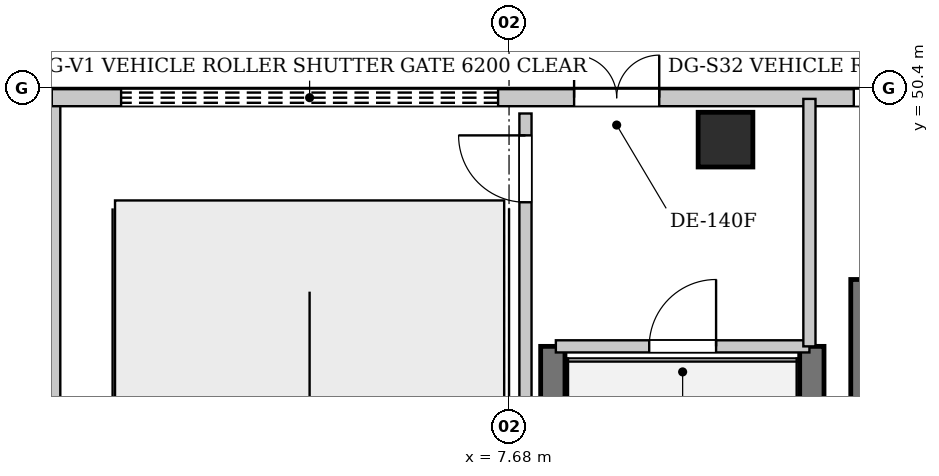
"""IFC4 building model, lengths in metres.
Left out: names, types, materials, properties, quantities, classifications, styles, units other than length and angle.
Written with IfcOpenShell. Run it as: python <this file> out.ifc"""

import sys

from ifc_helpers import new_model, si_unit, direction, frame, frame_2d, origin, origin_2d, place, context, subcontext, project, spatial, rectangle, extrude, element, fill, save


model = new_model("IFC4")
c1 = context("Model", 3, precision=1e-05, world=origin(), true_north=direction((0.0, 1.0)))
c2 = subcontext(c1, "Body", "Model", "MODEL_VIEW")
j1 = project(units=[si_unit("LENGTHUNIT", "METRE"), si_unit("PLANEANGLEUNIT", "RADIAN")], contexts=[c1])
p1 = place(None, origin())
s1 = spatial("IfcSite", under=j1, at=p1, CompositionType="ELEMENT")
p2 = place(p1, origin())
s2 = spatial("IfcBuilding", under=s1, at=p2, CompositionType="ELEMENT")
p3 = place(p2, origin())
s3 = spatial("IfcBuildingStorey", under=s2, at=p3, CompositionType="ELEMENT", Elevation=0.0)
for number, where, z_axis, x_axis in (
    (1, (8.4, 37.9, 0.0), (0.0, 0.0, 1.0), (0.0, 1.0, 0.0)),
    (2, (12.66, 37.9, 0.0), (0.0, 0.0, 1.0), (0.0, 1.0, 0.0)),
):
    element("IfcWall", number, at=place(p3, frame(where, z_axis=z_axis, x_axis=x_axis)), inside=s3, PredefinedType="SHEAR", context=c2, shape_type="SweptSolid", body=[
        extrude(rectangle(XDim=8.25, YDim=0.4, at=frame_2d((4.125, 0.0))), origin(), (0.0, 0.0, 1.0), 4.94),
    ])
p4 = place(p3, frame((13.5, 39.65, 0.0), z_axis=(0.0, 0.0, 1.0), x_axis=(0.0, 1.0, 0.0)))
e3 = element("IfcWall", 3, at=p4, inside=s3, PredefinedType="SHEAR", context=c2, shape_type="SweptSolid", body=[
    extrude(rectangle(XDim=7.6, YDim=0.4, at=frame_2d((3.8, 0.0))), origin(), (0.0, 0.0, 1.0), 4.94),
])
p5 = place(p3, frame((11.24, 49.55, 0.0), z_axis=(0.0, 0.0, 1.0), x_axis=(1.0, 0.0, 0.0)))
e4 = element("IfcColumn", 4, at=p5, inside=s3, PredefinedType="COLUMN", context=c2, shape_type="SweptSolid", body=[
    extrude(rectangle(XDim=0.9, YDim=0.9, at=origin_2d()), origin(), (0.0, 0.0, 1.0), 5.2),
])
p6 = place(p3, frame((0.16, 0.16, 0.0), z_axis=(0.0, 0.0, 1.0), x_axis=(0.0, 1.0, 0.0)))
e5 = element("IfcWall", 5, at=p6, inside=s3, PredefinedType="SOLIDWALL", context=c2, shape_type="SweptSolid", body=[
    extrude(rectangle(XDim=50.08, YDim=0.28, at=frame_2d((25.04, 0.0))), origin(), (0.0, 0.0, 1.0), 4.94),
])
p7 = place(p6, frame((13.422, 0.0, 1.0)))
e6 = element("IfcOpeningElement", 6, at=p7, cuts=e5, PredefinedType="OPENING", context=c2, shape_type="SweptSolid", body=[
    extrude(rectangle(XDim=1.2, YDim=1.8, at=frame_2d((0.6, 0.9))), frame((0.0, 0.15, 0.0), z_axis=(0.0, -1.0, 0.0), x_axis=(1.0, 0.0, 0.0)), (0.0, 0.0, 1.0), 0.3),
])
p8 = place(p6, frame((35.458, 0.0, 1.0)))
e7 = element("IfcOpeningElement", 7, at=p8, cuts=e5, PredefinedType="OPENING", context=c2, shape_type="SweptSolid", body=[
    extrude(rectangle(XDim=1.2, YDim=1.8, at=frame_2d((0.6, 0.9))), frame((0.0, 0.15, 0.0), z_axis=(0.0, -1.0, 0.0), x_axis=(1.0, 0.0, 0.0)), (0.0, 0.0, 1.0), 0.3),
])
p9 = place(p3, frame((76.64, 50.24, 0.0), z_axis=(0.0, 0.0, 1.0), x_axis=(-1.0, 0.0, 0.0)))
e8 = element("IfcWall", 8, at=p9, inside=s3, PredefinedType="SOLIDWALL", context=c2, shape_type="SweptSolid", body=[
    extrude(rectangle(XDim=76.48, YDim=0.28, at=frame_2d((38.24, 0.0))), origin(), (0.0, 0.0, 1.0), 4.94),
])
p10 = place(p9, frame((69.14, 0.0, 0.0)))
e9 = element("IfcOpeningElement", 9, at=p10, cuts=e8, PredefinedType="OPENING", context=c2, shape_type="SweptSolid", body=[
    extrude(rectangle(XDim=6.2, YDim=4.5, at=frame_2d((3.1, 2.25))), frame((0.0, 0.15, 0.0), z_axis=(0.0, -1.0, 0.0), x_axis=(1.0, 0.0, 0.0)), (0.0, 0.0, 1.0), 0.3),
])
p11 = place(p9, frame((66.49, 0.0, 0.0)))
e10 = element("IfcOpeningElement", 10, at=p11, cuts=e8, PredefinedType="OPENING", context=c2, shape_type="SweptSolid", body=[
    extrude(rectangle(XDim=1.4, YDim=2.2, at=frame_2d((0.7, 1.1))), frame((0.0, 0.15, 0.0), z_axis=(0.0, -1.0, 0.0), x_axis=(1.0, 0.0, 0.0)), (0.0, 0.0, 1.0), 0.3),
])
p12 = place(p9, frame((56.39, 0.0, 0.0)))
e11 = element("IfcOpeningElement", 11, at=p12, cuts=e8, PredefinedType="OPENING", context=c2, shape_type="SweptSolid", body=[
    extrude(rectangle(XDim=1.4, YDim=2.2, at=frame_2d((0.7, 1.1))), frame((0.0, 0.15, 0.0), z_axis=(0.0, -1.0, 0.0), x_axis=(1.0, 0.0, 0.0)), (0.0, 0.0, 1.0), 0.3),
])
p13 = place(p9, frame((54.29, 0.0, 0.0)))
e12 = element("IfcOpeningElement", 12, at=p13, cuts=e8, PredefinedType="OPENING", context=c2, shape_type="SweptSolid", body=[
    extrude(rectangle(XDim=1.4, YDim=2.2, at=frame_2d((0.7, 1.1))), frame((0.0, 0.15, 0.0), z_axis=(0.0, -1.0, 0.0), x_axis=(1.0, 0.0, 0.0)), (0.0, 0.0, 1.0), 0.3),
])
p14 = place(p9, frame((20.74, 0.0, 0.0)))
e13 = element("IfcOpeningElement", 13, at=p14, cuts=e8, PredefinedType="OPENING", context=c2, shape_type="SweptSolid", body=[
    extrude(rectangle(XDim=1.4, YDim=2.2, at=frame_2d((0.7, 1.1))), frame((0.0, 0.15, 0.0), z_axis=(0.0, -1.0, 0.0), x_axis=(1.0, 0.0, 0.0)), (0.0, 0.0, 1.0), 0.3),
])
p15 = place(p9, frame((8.89, 0.0, 0.0)))
e14 = element("IfcOpeningElement", 14, at=p15, cuts=e8, PredefinedType="OPENING", context=c2, shape_type="SweptSolid", body=[
    extrude(rectangle(XDim=1.4, YDim=2.2, at=frame_2d((0.7, 1.1))), frame((0.0, 0.15, 0.0), z_axis=(0.0, -1.0, 0.0), x_axis=(1.0, 0.0, 0.0)), (0.0, 0.0, 1.0), 0.3),
])
p16 = place(p9, frame((60.09, 0.0, 0.0)))
e15 = element("IfcOpeningElement", 15, at=p16, cuts=e8, PredefinedType="OPENING", context=c2, shape_type="SweptSolid", body=[
    extrude(rectangle(XDim=3.2, YDim=3.4, at=frame_2d((1.6, 1.7))), frame((0.0, 0.15, 0.0), z_axis=(0.0, -1.0, 0.0), x_axis=(1.0, 0.0, 0.0)), (0.0, 0.0, 1.0), 0.3),
])
p17 = place(p9, frame((13.29, 0.0, 0.0)))
e16 = element("IfcOpeningElement", 16, at=p17, cuts=e8, PredefinedType="OPENING", context=c2, shape_type="SweptSolid", body=[
    extrude(rectangle(XDim=3.2, YDim=3.4, at=frame_2d((1.6, 1.7))), frame((0.0, 0.15, 0.0), z_axis=(0.0, -1.0, 0.0), x_axis=(1.0, 0.0, 0.0)), (0.0, 0.0, 1.0), 0.3),
])
p18 = place(p9, frame((4.99, 0.0, 0.0)))
e17 = element("IfcOpeningElement", 17, at=p18, cuts=e8, PredefinedType="OPENING", context=c2, shape_type="SweptSolid", body=[
    extrude(rectangle(XDim=3.2, YDim=3.4, at=frame_2d((1.6, 1.7))), frame((0.0, 0.15, 0.0), z_axis=(0.0, -1.0, 0.0), x_axis=(1.0, 0.0, 0.0)), (0.0, 0.0, 1.0), 0.3),
])
p19 = place(p3, frame((8.45, 46.15, 0.0), z_axis=(0.0, 0.0, 1.0), x_axis=(1.0, 0.0, 0.0)))
e18 = element("IfcWall", 18, at=p19, inside=s3, PredefinedType="PARTITIONING", context=c2, shape_type="SweptSolid", body=[
    extrude(rectangle(XDim=4.17, YDim=0.2, at=frame_2d((2.085, 0.0))), origin(), (0.0, 0.0, 1.0), 4.94),
])
p20 = place(p19, frame((1.535, 0.0, 0.0)))
e19 = element("IfcOpeningElement", 19, at=p20, cuts=e18, PredefinedType="OPENING", context=c2, shape_type="SweptSolid", body=[
    extrude(rectangle(XDim=1.1, YDim=2.15, at=frame_2d((0.55, 1.075))), frame((0.0, 0.11, 0.0), z_axis=(0.0, -1.0, 0.0), x_axis=(1.0, 0.0, 0.0)), (0.0, 0.0, 1.0), 0.22),
])
p21 = place(p3, frame((7.95, 0.42, 0.0), z_axis=(0.0, 0.0, 1.0), x_axis=(0.0, 1.0, 0.0)))
e20 = element("IfcWall", 20, at=p21, inside=s3, PredefinedType="PARTITIONING", context=c2, shape_type="SweptSolid", body=[
    extrude(rectangle(XDim=49.56, YDim=0.2, at=frame_2d((24.78, 0.0))), origin(), (0.0, 0.0, 1.0), 4.94),
])
p22 = place(p21, frame((48.1, 0.0, 0.0)))
e21 = element("IfcOpeningElement", 21, at=p22, cuts=e20, PredefinedType="OPENING", context=c2, shape_type="SweptSolid", body=[
    extrude(rectangle(XDim=1.1, YDim=2.15, at=frame_2d((0.55, 1.075))), frame((0.0, 0.11, 0.0), z_axis=(0.0, -1.0, 0.0), x_axis=(1.0, 0.0, 0.0)), (0.0, 0.0, 1.0), 0.22),
])
p23 = place(p3, frame((12.62, 46.15, 0.0), z_axis=(0.0, 0.0, 1.0), x_axis=(0.0, 1.0, 0.0)))
e22 = element("IfcWall", 22, at=p23, inside=s3, PredefinedType="PARTITIONING", context=c2, shape_type="SweptSolid", body=[
    extrude(rectangle(XDim=4.07, YDim=0.2, at=frame_2d((2.035, 0.0))), origin(), (0.0, 0.0, 1.0), 4.94),
])
p24 = place(p10, frame((6.2, 0.0, 0.0), z_axis=(0.0, 0.0, 1.0), x_axis=(-1.0, 0.0, 0.0)))
e23 = element("IfcDoor", 23, at=p24, inside=s3, OperationType="SINGLE_SWING_LEFT", PredefinedType="GATE", context=c2, shape_type="SweptSolid", body=[
    extrude(rectangle(XDim=6.2, YDim=4.5, at=frame_2d((3.1, 2.25))), frame((0.0, 0.025, 0.0), z_axis=(0.0, -1.0, 0.0), x_axis=(1.0, 0.0, 0.0)), (0.0, 0.0, 1.0), 0.05),
])
fill(e9, e23)
p25 = place(p11, frame((1.4, 0.0, 0.0), z_axis=(0.0, 0.0, 1.0), x_axis=(-1.0, 0.0, 0.0)))
e24 = element("IfcDoor", 24, at=p25, inside=s3, OperationType="SINGLE_SWING_LEFT", PredefinedType="DOOR", context=c2, shape_type="SweptSolid", body=[
    extrude(rectangle(XDim=1.4, YDim=2.2, at=frame_2d((0.7, 1.1))), frame((0.0, 0.025, 0.0), z_axis=(0.0, -1.0, 0.0), x_axis=(1.0, 0.0, 0.0)), (0.0, 0.0, 1.0), 0.05),
])
fill(e10, e24)
p26 = place(p16, frame((3.2, 0.0, 0.0), z_axis=(0.0, 0.0, 1.0), x_axis=(-1.0, 0.0, 0.0)))
e25 = element("IfcDoor", 25, at=p26, inside=s3, OperationType="SINGLE_SWING_LEFT", PredefinedType="GATE", context=c2, shape_type="SweptSolid", body=[
    extrude(rectangle(XDim=3.2, YDim=3.4, at=frame_2d((1.6, 1.7))), frame((0.0, 0.025, 0.0), z_axis=(0.0, -1.0, 0.0), x_axis=(1.0, 0.0, 0.0)), (0.0, 0.0, 1.0), 0.05),
])
fill(e15, e25)
p27 = place(p20, origin())
e26 = element("IfcDoor", 26, at=p27, inside=s3, OperationType="SINGLE_SWING_RIGHT", PredefinedType="DOOR", context=c2, shape_type="SweptSolid", body=[
    extrude(rectangle(XDim=1.1, YDim=2.15, at=frame_2d((0.55, 1.075))), frame((0.0, 0.025, 0.0), z_axis=(0.0, -1.0, 0.0), x_axis=(1.0, 0.0, 0.0)), (0.0, 0.0, 1.0), 0.05),
])
fill(e19, e26)
p28 = place(p22, origin())
e27 = element("IfcDoor", 27, at=p28, inside=s3, OperationType="SINGLE_SWING_RIGHT", PredefinedType="DOOR", context=c2, shape_type="SweptSolid", body=[
    extrude(rectangle(XDim=1.1, YDim=2.15, at=frame_2d((0.55, 1.075))), frame((0.0, 0.025, 0.0), z_axis=(0.0, -1.0, 0.0), x_axis=(1.0, 0.0, 0.0)), (0.0, 0.0, 1.0), 0.05),
])
fill(e21, e27)
save(model, sys.argv[1])
